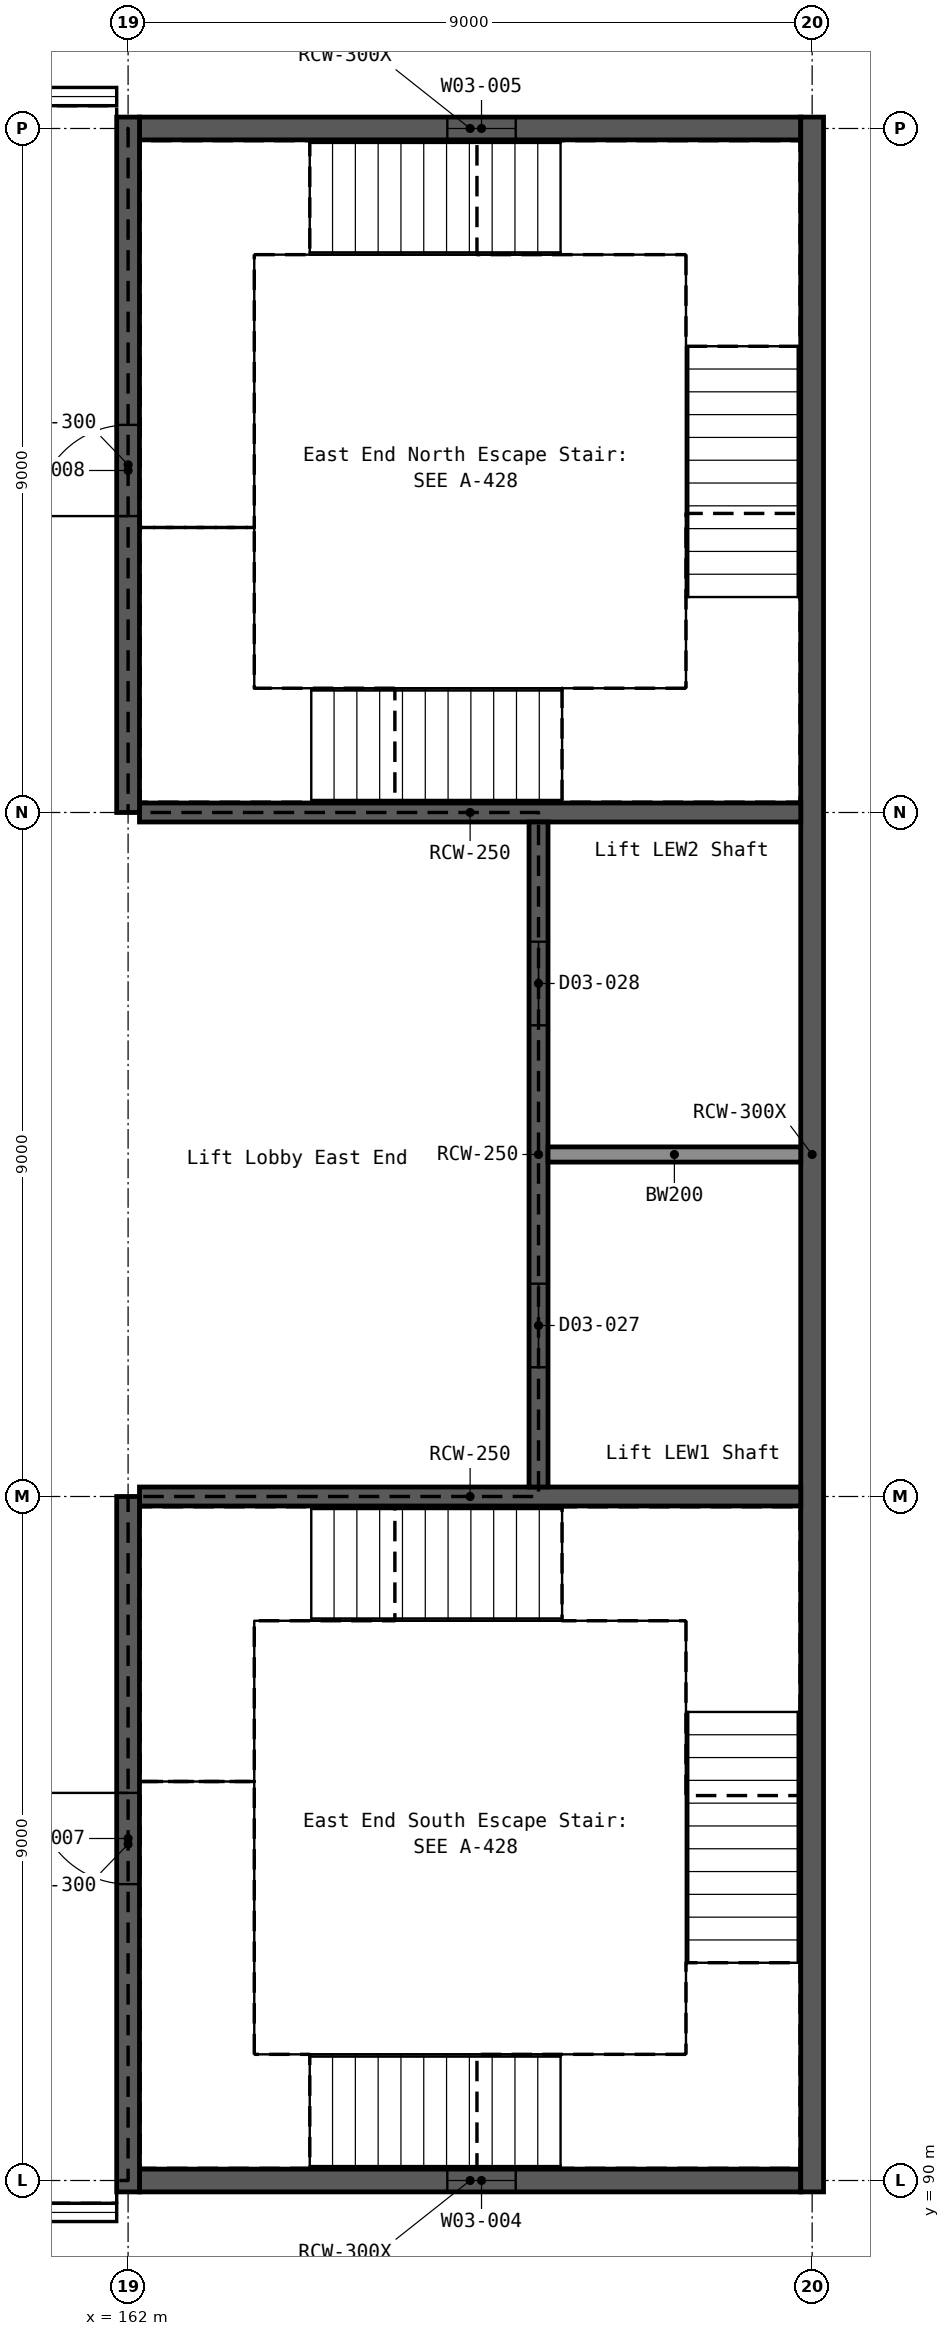
"""IFC4 building model, lengths in metres.
Left out: names, types, materials, properties, quantities, classifications, styles, units other than length and angle.
Written with IfcOpenShell. Run it as: python <this file> out.ifc"""

import sys

from ifc_helpers import new_model, si_unit, direction, frame, frame_2d, origin, place, context, subcontext, project, spatial, rectangle, extrude, element, fill, save


model = new_model("IFC4")
c1 = context("Model", 3, precision=1e-05, world=origin(), true_north=direction((0.0, 1.0)))
c2 = subcontext(c1, "Body", "Model", "MODEL_VIEW")
j1 = project(units=[si_unit("LENGTHUNIT", "METRE"), si_unit("PLANEANGLEUNIT", "RADIAN")], contexts=[c1])
p1 = place(None, origin())
s1 = spatial("IfcSite", under=j1, at=p1, CompositionType="ELEMENT")
p2 = place(p1, origin())
s2 = spatial("IfcBuilding", under=s1, at=p2, CompositionType="ELEMENT")
p3 = place(p2, frame((0.0, 0.0, 16.2)))
s3 = spatial("IfcBuildingStorey", under=s2, at=p3, CompositionType="ELEMENT", Elevation=16.2)
p4 = place(p3, frame((162.15, 90.0, 0.0), z_axis=(0.0, 0.0, 1.0), x_axis=(1.0, 0.0, 0.0)))
e1 = element("IfcWall", 1, at=p4, inside=s3, PredefinedType="SHEAR", context=c2, shape_type="SweptSolid", body=[
    extrude(rectangle(XDim=8.7, YDim=0.3, at=frame_2d((4.35, 0.0))), origin(), (0.0, 0.0, 1.0), 5.4),
])
p5 = place(p4, frame((4.05, 0.0, 1.5)))
e2 = element("IfcOpeningElement", 2, at=p5, cuts=e1, PredefinedType="OPENING", context=c2, shape_type="SweptSolid", body=[
    extrude(rectangle(XDim=0.9, YDim=1.2, at=frame_2d((0.45, 0.6))), frame((0.0, 0.161, 0.0), z_axis=(0.0, -1.0, 0.0), x_axis=(1.0, 0.0, 0.0)), (0.0, 0.0, 1.0), 0.322),
])
p6 = place(p3, frame((162.15, 117.0, 0.0), z_axis=(0.0, 0.0, 1.0), x_axis=(1.0, 0.0, 0.0)))
e3 = element("IfcWall", 3, at=p6, inside=s3, PredefinedType="SHEAR", context=c2, shape_type="SweptSolid", body=[
    extrude(rectangle(XDim=8.7, YDim=0.3, at=frame_2d((4.35, 0.0))), origin(), (0.0, 0.0, 1.0), 5.4),
])
p7 = place(p6, frame((4.05, 0.0, 1.5)))
e4 = element("IfcOpeningElement", 4, at=p7, cuts=e3, PredefinedType="OPENING", context=c2, shape_type="SweptSolid", body=[
    extrude(rectangle(XDim=0.9, YDim=1.2, at=frame_2d((0.45, 0.6))), frame((0.0, 0.161, 0.0), z_axis=(0.0, -1.0, 0.0), x_axis=(1.0, 0.0, 0.0)), (0.0, 0.0, 1.0), 0.322),
])
p8 = place(p3, frame((171.0, 89.85, 0.0), z_axis=(0.0, 0.0, 1.0), x_axis=(0.0, 1.0, 0.0)))
e5 = element("IfcWall", 5, at=p8, inside=s3, PredefinedType="SHEAR", context=c2, shape_type="SweptSolid", body=[
    extrude(rectangle(XDim=27.3, YDim=0.3, at=frame_2d((13.65, 0.0))), origin(), (0.0, 0.0, 1.0), 5.4),
])
for number, where, z_axis, x_axis in (
    (6, (162.15, 99.0, 0.0), (0.0, 0.0, 1.0), (1.0, 0.0, 0.0)),
    (7, (162.15, 108.0, 0.0), (0.0, 0.0, 1.0), (1.0, 0.0, 0.0)),
):
    element("IfcWall", number, at=place(p3, frame(where, z_axis=z_axis, x_axis=x_axis)), inside=s3, PredefinedType="SHEAR", context=c2, shape_type="SweptSolid", body=[
        extrude(rectangle(XDim=8.7, YDim=0.25, at=frame_2d((4.35, 0.0))), origin(), (0.0, 0.0, 1.0), 5.4),
    ])
p9 = place(p3, frame((167.4, 99.125, 0.0), z_axis=(0.0, 0.0, 1.0), x_axis=(0.0, 1.0, 0.0)))
e8 = element("IfcWall", 8, at=p9, inside=s3, PredefinedType="SHEAR", context=c2, shape_type="SweptSolid", body=[
    extrude(rectangle(XDim=8.75, YDim=0.25, at=frame_2d((4.375, 0.0))), origin(), (0.0, 0.0, 1.0), 5.4),
])
p10 = place(p9, frame((1.575, 0.0, 0.0)))
e9 = element("IfcOpeningElement", 9, at=p10, cuts=e8, PredefinedType="OPENING", context=c2, shape_type="SweptSolid", body=[
    extrude(rectangle(XDim=1.1, YDim=2.1, at=frame_2d((0.55, 1.05))), frame((0.0, 0.136, 0.0), z_axis=(0.0, -1.0, 0.0), x_axis=(1.0, 0.0, 0.0)), (0.0, 0.0, 1.0), 0.272),
])
p11 = place(p9, frame((6.075, 0.0, 0.0)))
e10 = element("IfcOpeningElement", 10, at=p11, cuts=e8, PredefinedType="OPENING", context=c2, shape_type="SweptSolid", body=[
    extrude(rectangle(XDim=1.1, YDim=2.1, at=frame_2d((0.55, 1.05))), frame((0.0, 0.136, 0.0), z_axis=(0.0, -1.0, 0.0), x_axis=(1.0, 0.0, 0.0)), (0.0, 0.0, 1.0), 0.272),
])
p12 = place(p3, frame((162.0, 89.85, 0.0), z_axis=(0.0, 0.0, 1.0), x_axis=(0.0, 1.0, 0.0)))
e11 = element("IfcWall", 11, at=p12, inside=s3, PredefinedType="SHEAR", context=c2, shape_type="SweptSolid", body=[
    extrude(rectangle(XDim=9.15, YDim=0.3, at=frame_2d((4.575, 0.0))), origin(), (0.0, 0.0, 1.0), 5.4),
])
p13 = place(p12, frame((4.05, 0.0, 0.0)))
e12 = element("IfcOpeningElement", 12, at=p13, cuts=e11, PredefinedType="OPENING", context=c2, shape_type="SweptSolid", body=[
    extrude(rectangle(XDim=1.2, YDim=2.1, at=frame_2d((0.6, 1.05))), frame((0.0, 0.161, 0.0), z_axis=(0.0, -1.0, 0.0), x_axis=(1.0, 0.0, 0.0)), (0.0, 0.0, 1.0), 0.322),
])
p14 = place(p3, frame((162.0, 108.0, 0.0), z_axis=(0.0, 0.0, 1.0), x_axis=(0.0, 1.0, 0.0)))
e13 = element("IfcWall", 13, at=p14, inside=s3, PredefinedType="SHEAR", context=c2, shape_type="SweptSolid", body=[
    extrude(rectangle(XDim=9.15, YDim=0.3, at=frame_2d((4.575, 0.0))), origin(), (0.0, 0.0, 1.0), 5.4),
])
p15 = place(p14, frame((3.9, 0.0, 0.0)))
e14 = element("IfcOpeningElement", 14, at=p15, cuts=e13, PredefinedType="OPENING", context=c2, shape_type="SweptSolid", body=[
    extrude(rectangle(XDim=1.2, YDim=2.1, at=frame_2d((0.6, 1.05))), frame((0.0, 0.161, 0.0), z_axis=(0.0, -1.0, 0.0), x_axis=(1.0, 0.0, 0.0)), (0.0, 0.0, 1.0), 0.322),
])
p16 = place(p3, frame((167.525, 103.5, 0.0), z_axis=(0.0, 0.0, 1.0), x_axis=(1.0, 0.0, 0.0)))
e15 = element("IfcWall", 15, at=p16, inside=s3, PredefinedType="SOLIDWALL", context=c2, shape_type="SweptSolid", body=[
    extrude(rectangle(XDim=3.325, YDim=0.2, at=frame_2d((1.663, 0.0))), origin(), (0.0, 0.0, 1.0), 5.4),
])
p17 = place(p5, origin())
e16 = element("IfcWindow", 16, at=p17, inside=s3, PartitioningType="SINGLE_PANEL", PredefinedType="WINDOW", context=c2, shape_type="SweptSolid", body=[
    extrude(rectangle(XDim=0.9, YDim=1.2, at=frame_2d((0.45, 0.6))), frame((0.0, 0.03, 0.0), z_axis=(0.0, -1.0, 0.0), x_axis=(1.0, 0.0, 0.0)), (0.0, 0.0, 1.0), 0.06),
])
fill(e2, e16)
p18 = place(p7, origin())
e17 = element("IfcWindow", 17, at=p18, inside=s3, PartitioningType="SINGLE_PANEL", PredefinedType="WINDOW", context=c2, shape_type="SweptSolid", body=[
    extrude(rectangle(XDim=0.9, YDim=1.2, at=frame_2d((0.45, 0.6))), frame((0.0, 0.03, 0.0), z_axis=(0.0, -1.0, 0.0), x_axis=(1.0, 0.0, 0.0)), (0.0, 0.0, 1.0), 0.06),
])
fill(e4, e17)
p19 = place(p13, origin())
e18 = element("IfcDoor", 18, at=p19, inside=s3, OperationType="SINGLE_SWING_RIGHT", PredefinedType="DOOR", context=c2, shape_type="SweptSolid", body=[
    extrude(rectangle(XDim=1.2, YDim=2.1, at=frame_2d((0.6, 1.05))), frame((0.0, 0.025, 0.0), z_axis=(0.0, -1.0, 0.0), x_axis=(1.0, 0.0, 0.0)), (0.0, 0.0, 1.0), 0.05),
])
fill(e12, e18)
p20 = place(p15, origin())
e19 = element("IfcDoor", 19, at=p20, inside=s3, OperationType="SINGLE_SWING_LEFT", PredefinedType="DOOR", context=c2, shape_type="SweptSolid", body=[
    extrude(rectangle(XDim=1.2, YDim=2.1, at=frame_2d((0.6, 1.05))), frame((0.0, 0.025, 0.0), z_axis=(0.0, -1.0, 0.0), x_axis=(1.0, 0.0, 0.0)), (0.0, 0.0, 1.0), 0.05),
])
fill(e14, e19)
p21 = place(p10, origin())
e20 = element("IfcDoor", 20, at=p21, inside=s3, OperationType="DOUBLE_DOOR_SLIDING", PredefinedType="DOOR", context=c2, shape_type="SweptSolid", body=[
    extrude(rectangle(XDim=1.1, YDim=2.1, at=frame_2d((0.55, 1.05))), frame((0.0, 0.025, 0.0), z_axis=(0.0, -1.0, 0.0), x_axis=(1.0, 0.0, 0.0)), (0.0, 0.0, 1.0), 0.05),
])
fill(e9, e20)
p22 = place(p11, origin())
e21 = element("IfcDoor", 21, at=p22, inside=s3, OperationType="DOUBLE_DOOR_SLIDING", PredefinedType="DOOR", context=c2, shape_type="SweptSolid", body=[
    extrude(rectangle(XDim=1.1, YDim=2.1, at=frame_2d((0.55, 1.05))), frame((0.0, 0.025, 0.0), z_axis=(0.0, -1.0, 0.0), x_axis=(1.0, 0.0, 0.0)), (0.0, 0.0, 1.0), 0.05),
])
fill(e10, e21)
save(model, sys.argv[1])
